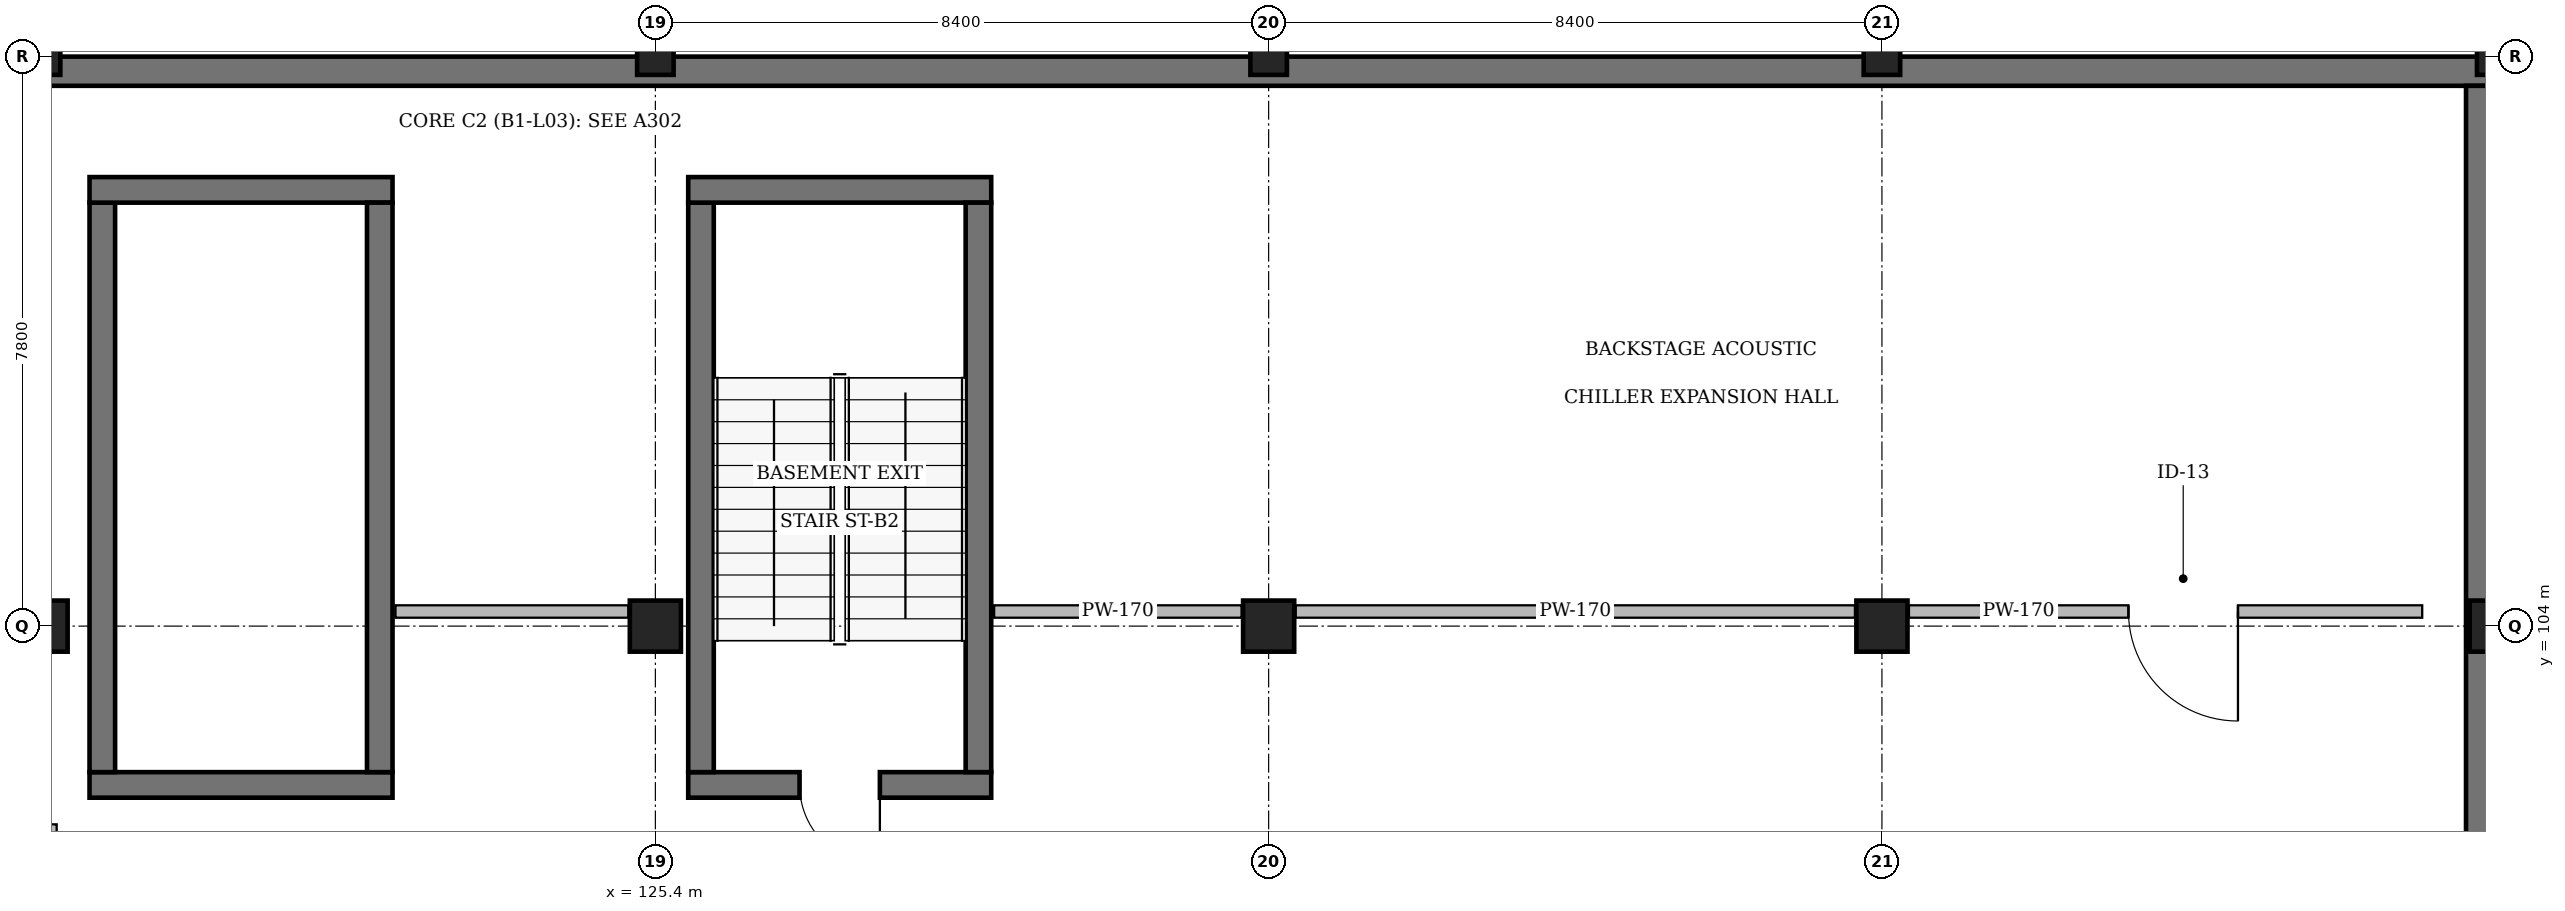
"""IFC4 building model, lengths in metres.
Left out: names, types, materials, properties, quantities, classifications, styles, units other than length and angle.
Written with IfcOpenShell. Run it as: python <this file> out.ifc"""

import sys

from ifc_helpers import new_model, si_unit, direction, frame, frame_2d, origin, origin_2d, place, context, subcontext, project, spatial, rectangle, extrude, element, fill, save


model = new_model("IFC4")
c1 = context("Model", 3, precision=1e-05, world=origin(), true_north=direction((0.0, 1.0)))
c2 = subcontext(c1, "Body", "Model", "MODEL_VIEW")
j1 = project(units=[si_unit("LENGTHUNIT", "METRE"), si_unit("PLANEANGLEUNIT", "RADIAN")], contexts=[c1])
p1 = place(None, origin())
s1 = spatial("IfcSite", under=j1, at=p1, CompositionType="ELEMENT")
p2 = place(p1, origin())
s2 = spatial("IfcBuilding", under=s1, at=p2, CompositionType="ELEMENT")
p3 = place(p2, frame((0.0, 0.0, -4.8)))
s3 = spatial("IfcBuildingStorey", under=s2, at=p3, CompositionType="ELEMENT", Elevation=-4.8)
p4 = place(p3, frame((117.0, 104.0, 0.0), z_axis=(0.0, 0.0, 1.0), x_axis=(1.0, 0.0, 0.0)))
e1 = element("IfcColumn", 1, at=p4, inside=s3, PredefinedType="COLUMN", context=c2, shape_type="SweptSolid", body=[
    extrude(rectangle(XDim=0.7, YDim=0.7, at=origin_2d()), origin(), (0.0, 0.0, 1.0), 4.8),
])
p5 = place(p3, frame((117.0, 111.8, 0.0), z_axis=(0.0, 0.0, 1.0), x_axis=(1.0, 0.0, 0.0)))
e2 = element("IfcColumn", 2, at=p5, inside=s3, PredefinedType="COLUMN", context=c2, shape_type="SweptSolid", body=[
    extrude(rectangle(XDim=0.5, YDim=0.5, at=origin_2d()), origin(), (0.0, 0.0, 1.0), 4.8),
])
p6 = place(p3, frame((125.4, 104.0, 0.0), z_axis=(0.0, 0.0, 1.0), x_axis=(1.0, 0.0, 0.0)))
e3 = element("IfcColumn", 3, at=p6, inside=s3, PredefinedType="COLUMN", context=c2, shape_type="SweptSolid", body=[
    extrude(rectangle(XDim=0.7, YDim=0.7, at=origin_2d()), origin(), (0.0, 0.0, 1.0), 4.8),
])
p7 = place(p3, frame((125.4, 111.8, 0.0), z_axis=(0.0, 0.0, 1.0), x_axis=(1.0, 0.0, 0.0)))
e4 = element("IfcColumn", 4, at=p7, inside=s3, PredefinedType="COLUMN", context=c2, shape_type="SweptSolid", body=[
    extrude(rectangle(XDim=0.5, YDim=0.5, at=origin_2d()), origin(), (0.0, 0.0, 1.0), 4.8),
])
p8 = place(p3, frame((133.8, 104.0, 0.0), z_axis=(0.0, 0.0, 1.0), x_axis=(1.0, 0.0, 0.0)))
e5 = element("IfcColumn", 5, at=p8, inside=s3, PredefinedType="COLUMN", context=c2, shape_type="SweptSolid", body=[
    extrude(rectangle(XDim=0.7, YDim=0.7, at=origin_2d()), origin(), (0.0, 0.0, 1.0), 4.8),
])
p9 = place(p3, frame((133.8, 111.8, 0.0), z_axis=(0.0, 0.0, 1.0), x_axis=(1.0, 0.0, 0.0)))
e6 = element("IfcColumn", 6, at=p9, inside=s3, PredefinedType="COLUMN", context=c2, shape_type="SweptSolid", body=[
    extrude(rectangle(XDim=0.5, YDim=0.5, at=origin_2d()), origin(), (0.0, 0.0, 1.0), 4.8),
])
p10 = place(p3, frame((142.2, 104.0, 0.0), z_axis=(0.0, 0.0, 1.0), x_axis=(1.0, 0.0, 0.0)))
e7 = element("IfcColumn", 7, at=p10, inside=s3, PredefinedType="COLUMN", context=c2, shape_type="SweptSolid", body=[
    extrude(rectangle(XDim=0.7, YDim=0.7, at=origin_2d()), origin(), (0.0, 0.0, 1.0), 4.8),
])
p11 = place(p3, frame((142.2, 111.8, 0.0), z_axis=(0.0, 0.0, 1.0), x_axis=(1.0, 0.0, 0.0)))
e8 = element("IfcColumn", 8, at=p11, inside=s3, PredefinedType="COLUMN", context=c2, shape_type="SweptSolid", body=[
    extrude(rectangle(XDim=0.5, YDim=0.5, at=origin_2d()), origin(), (0.0, 0.0, 1.0), 4.8),
])
p12 = place(p3, frame((150.6, 104.0, 0.0), z_axis=(0.0, 0.0, 1.0), x_axis=(1.0, 0.0, 0.0)))
e9 = element("IfcColumn", 9, at=p12, inside=s3, PredefinedType="COLUMN", context=c2, shape_type="SweptSolid", body=[
    extrude(rectangle(XDim=0.7, YDim=0.7, at=origin_2d()), origin(), (0.0, 0.0, 1.0), 4.8),
])
p13 = place(p3, frame((150.6, 111.8, 0.0), z_axis=(0.0, 0.0, 1.0), x_axis=(1.0, 0.0, 0.0)))
e10 = element("IfcColumn", 10, at=p13, inside=s3, PredefinedType="COLUMN", context=c2, shape_type="SweptSolid", body=[
    extrude(rectangle(XDim=0.5, YDim=0.5, at=origin_2d()), origin(), (0.0, 0.0, 1.0), 4.8),
])
p14 = place(p3, frame((121.8, 101.825, 0.0), z_axis=(0.0, 0.0, 1.0), x_axis=(-1.0, 0.0, 0.0)))
e11 = element("IfcWall", 11, at=p14, inside=s3, PredefinedType="SOLIDWALL", context=c2, shape_type="SweptSolid", body=[
    extrude(rectangle(XDim=4.15, YDim=0.35, at=frame_2d((2.075, 0.0))), origin(), (0.0, 0.0, 1.0), 4.48),
])
p15 = place(p3, frame((117.825, 102.0, 0.0), z_axis=(0.0, 0.0, 1.0), x_axis=(0.0, 1.0, 0.0)))
e12 = element("IfcWall", 12, at=p15, inside=s3, PredefinedType="SOLIDWALL", context=c2, shape_type="SweptSolid", body=[
    extrude(rectangle(XDim=7.8, YDim=0.35, at=frame_2d((3.9, 0.0))), origin(), (0.0, 0.0, 1.0), 4.48),
])
p16 = place(p3, frame((117.65, 109.975, 0.0), z_axis=(0.0, 0.0, 1.0), x_axis=(1.0, 0.0, 0.0)))
e13 = element("IfcWall", 13, at=p16, inside=s3, PredefinedType="SOLIDWALL", context=c2, shape_type="SweptSolid", body=[
    extrude(rectangle(XDim=4.15, YDim=0.35, at=frame_2d((2.075, 0.0))), origin(), (0.0, 0.0, 1.0), 4.48),
])
p17 = place(p3, frame((121.625, 109.8, 0.0), z_axis=(0.0, 0.0, 1.0), x_axis=(0.0, -1.0, 0.0)))
e14 = element("IfcWall", 14, at=p17, inside=s3, PredefinedType="SOLIDWALL", context=c2, shape_type="SweptSolid", body=[
    extrude(rectangle(XDim=7.8, YDim=0.35, at=frame_2d((3.9, 0.0))), origin(), (0.0, 0.0, 1.0), 4.48),
])
p18 = place(p3, frame((130.0, 101.825, 0.0), z_axis=(0.0, 0.0, 1.0), x_axis=(-1.0, 0.0, 0.0)))
e15 = element("IfcWall", 15, at=p18, inside=s3, PredefinedType="SOLIDWALL", context=c2, shape_type="SweptSolid", body=[
    extrude(rectangle(XDim=4.15, YDim=0.35, at=frame_2d((2.075, 0.0))), origin(), (0.0, 0.0, 1.0), 4.56),
])
p19 = place(p18, frame((1.525, 0.0, 0.0)))
e16 = element("IfcOpeningElement", 16, at=p19, cuts=e15, PredefinedType="OPENING", context=c2, shape_type="SweptSolid", body=[
    extrude(rectangle(XDim=1.1, YDim=2.15, at=frame_2d((0.55, 1.075))), frame((0.0, 0.195, 0.0), z_axis=(0.0, -1.0, 0.0), x_axis=(1.0, 0.0, 0.0)), (0.0, 0.0, 1.0), 0.39),
])
p20 = place(p3, frame((126.025, 102.0, 0.0), z_axis=(0.0, 0.0, 1.0), x_axis=(0.0, 1.0, 0.0)))
e17 = element("IfcWall", 17, at=p20, inside=s3, PredefinedType="SOLIDWALL", context=c2, shape_type="SweptSolid", body=[
    extrude(rectangle(XDim=7.8, YDim=0.35, at=frame_2d((3.9, 0.0))), origin(), (0.0, 0.0, 1.0), 4.56),
])
p21 = place(p3, frame((125.85, 109.975, 0.0), z_axis=(0.0, 0.0, 1.0), x_axis=(1.0, 0.0, 0.0)))
e18 = element("IfcWall", 18, at=p21, inside=s3, PredefinedType="SOLIDWALL", context=c2, shape_type="SweptSolid", body=[
    extrude(rectangle(XDim=4.15, YDim=0.35, at=frame_2d((2.075, 0.0))), origin(), (0.0, 0.0, 1.0), 4.56),
])
p22 = place(p3, frame((129.825, 109.8, 0.0), z_axis=(0.0, 0.0, 1.0), x_axis=(0.0, -1.0, 0.0)))
e19 = element("IfcWall", 19, at=p22, inside=s3, PredefinedType="SOLIDWALL", context=c2, shape_type="SweptSolid", body=[
    extrude(rectangle(XDim=7.8, YDim=0.35, at=frame_2d((3.9, 0.0))), origin(), (0.0, 0.0, 1.0), 4.56),
])
p23 = place(p3, frame((57.6, 111.6, 0.0), z_axis=(0.0, 0.0, 1.0), x_axis=(1.0, 0.0, 0.0)))
e20 = element("IfcWall", 20, at=p23, inside=s3, PredefinedType="SOLIDWALL", context=c2, shape_type="SweptSolid", body=[
    extrude(rectangle(XDim=93.0, YDim=0.4, at=frame_2d((46.5, 0.0))), origin(), (0.0, 0.0, 1.0), 4.48),
])
p24 = place(p3, frame((150.4, 88.2, 0.0), z_axis=(0.0, 0.0, 1.0), x_axis=(0.0, 1.0, 0.0)))
e21 = element("IfcWall", 21, at=p24, inside=s3, PredefinedType="SOLIDWALL", context=c2, shape_type="SweptSolid", body=[
    extrude(rectangle(XDim=23.2, YDim=0.4, at=frame_2d((11.6, 0.0))), origin(), (0.0, 0.0, 1.0), 4.48),
])
p25 = place(p3, frame((117.2, 101.2, 0.0), z_axis=(0.0, 0.0, 1.0), x_axis=(-1.0, 0.0, 0.0)))
e22 = element("IfcWall", 22, at=p25, inside=s3, PredefinedType="PARTITIONING", context=c2, shape_type="SweptSolid", body=[
    extrude(rectangle(XDim=8.8, YDim=0.17, at=frame_2d((4.4, 0.0))), origin(), (0.0, 0.0, 1.0), 4.48),
])
p26 = place(p25, frame((3.039, 0.0, 0.0)))
e23 = element("IfcOpeningElement", 23, at=p26, cuts=e22, PredefinedType="OPENING", context=c2, shape_type="SweptSolid", body=[
    extrude(rectangle(XDim=1.5, YDim=2.2, at=frame_2d((0.75, 1.1))), frame((0.0, 0.105, 0.0), z_axis=(0.0, -1.0, 0.0), x_axis=(1.0, 0.0, 0.0)), (0.0, 0.0, 1.0), 0.21),
])
p27 = place(p3, frame((149.6, 104.2, 0.0), z_axis=(0.0, 0.0, 1.0), x_axis=(-1.0, 0.0, 0.0)))
e24 = element("IfcWall", 24, at=p27, inside=s3, PredefinedType="PARTITIONING", context=c2, shape_type="SweptSolid", body=[
    extrude(rectangle(XDim=7.03, YDim=0.17, at=frame_2d((3.515, 0.0))), origin(), (0.0, 0.0, 1.0), 3.75),
])
p28 = place(p27, frame((2.523, 0.0, 0.0)))
e25 = element("IfcOpeningElement", 25, at=p28, cuts=e24, PredefinedType="OPENING", context=c2, shape_type="SweptSolid", body=[
    extrude(rectangle(XDim=1.5, YDim=2.2, at=frame_2d((0.75, 1.1))), frame((0.0, 0.105, 0.0), z_axis=(0.0, -1.0, 0.0), x_axis=(1.0, 0.0, 0.0)), (0.0, 0.0, 1.0), 0.21),
])
p29 = place(p3, frame((141.83, 104.2, 0.0), z_axis=(0.0, 0.0, 1.0), x_axis=(-1.0, 0.0, 0.0)))
e26 = element("IfcWall", 26, at=p29, inside=s3, PredefinedType="PARTITIONING", context=c2, shape_type="SweptSolid", body=[
    extrude(rectangle(XDim=7.66, YDim=0.17, at=frame_2d((3.83, 0.0))), origin(), (0.0, 0.0, 1.0), 3.75),
])
p30 = place(p3, frame((133.43, 104.2, 0.0), z_axis=(0.0, 0.0, 1.0), x_axis=(-1.0, 0.0, 0.0)))
e27 = element("IfcWall", 27, at=p30, inside=s3, PredefinedType="PARTITIONING", context=c2, shape_type="SweptSolid", body=[
    extrude(rectangle(XDim=3.39, YDim=0.17, at=frame_2d((1.695, 0.0))), origin(), (0.0, 0.0, 1.0), 4.48),
])
p31 = place(p3, frame((125.03, 104.2, 0.0), z_axis=(0.0, 0.0, 1.0), x_axis=(-1.0, 0.0, 0.0)))
e28 = element("IfcWall", 28, at=p31, inside=s3, PredefinedType="PARTITIONING", context=c2, shape_type="SweptSolid", body=[
    extrude(rectangle(XDim=3.19, YDim=0.17, at=frame_2d((1.595, 0.0))), origin(), (0.0, 0.0, 1.0), 4.48),
])
p32 = place(p19, origin())
e29 = element("IfcDoor", 29, at=p32, inside=s3, OperationType="SINGLE_SWING_LEFT", PredefinedType="DOOR", context=c2, shape_type="SweptSolid", body=[
    extrude(rectangle(XDim=1.1, YDim=2.15, at=frame_2d((0.55, 1.075))), frame((0.0, 0.025, 0.0), z_axis=(0.0, -1.0, 0.0), x_axis=(1.0, 0.0, 0.0)), (0.0, 0.0, 1.0), 0.05),
])
fill(e16, e29)
p33 = place(p28, origin())
e30 = element("IfcDoor", 30, at=p33, inside=s3, OperationType="DOUBLE_DOOR_SINGLE_SWING", PredefinedType="DOOR", context=c2, shape_type="SweptSolid", body=[
    extrude(rectangle(XDim=1.5, YDim=2.2, at=frame_2d((0.75, 1.1))), frame((0.0, 0.025, 0.0), z_axis=(0.0, -1.0, 0.0), x_axis=(1.0, 0.0, 0.0)), (0.0, 0.0, 1.0), 0.05),
])
fill(e25, e30)
save(model, sys.argv[1])
